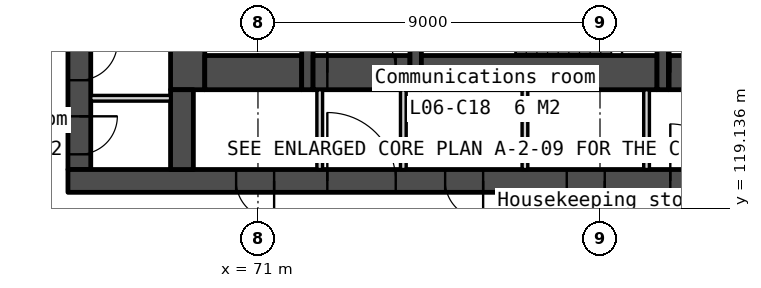
"""IFC4 building model, lengths in metres.
Left out: names, types, materials, properties, quantities, classifications, styles, units other than length and angle.
Written with IfcOpenShell. Run it as: python <this file> out.ifc"""

import sys

from ifc_helpers import new_model, si_unit, direction, frame, frame_2d, origin, place, context, subcontext, project, spatial, polyline, rectangle, outline, extrude, element, fill, save


model = new_model("IFC4")
c1 = context("Model", 3, precision=1e-05, world=origin(), true_north=direction((0.0, 1.0)))
c2 = subcontext(c1, "Body", "Model", "MODEL_VIEW")
j1 = project(units=[si_unit("LENGTHUNIT", "METRE"), si_unit("PLANEANGLEUNIT", "RADIAN")], contexts=[c1])
p1 = place(None, origin())
s1 = spatial("IfcSite", under=j1, at=p1, CompositionType="ELEMENT")
p2 = place(p1, origin())
s2 = spatial("IfcBuilding", under=s1, at=p2, CompositionType="ELEMENT")
p3 = place(p2, frame((0.0, 0.0, 35.0)))
s3 = spatial("IfcBuildingStorey", under=s2, at=p3, CompositionType="ELEMENT", Elevation=35.0)
p4 = place(p3, frame((66.3, 133.95, 0.0), z_axis=(0.0, 0.0, 1.0), x_axis=(0.0, -1.0, 0.0)))
e1 = element("IfcWall", 1, at=p4, inside=s3, PredefinedType="SOLIDWALL", context=c2, shape_type="SweptSolid", body=[
    extrude(rectangle(XDim=13.8, YDim=0.6, at=frame_2d((6.9, 0.0))), origin(), (0.0, 0.0, 1.0), 3.35),
])
p5 = place(p4, frame((0.6, 0.0, 0.0)))
e2 = element("IfcOpeningElement", 2, at=p5, cuts=e1, PredefinedType="OPENING", context=c2, shape_type="SweptSolid", body=[
    extrude(rectangle(XDim=1.1, YDim=2.1, at=frame_2d((0.55, 1.05))), frame((0.0, 0.31, 0.0), z_axis=(0.0, -1.0, 0.0), x_axis=(1.0, 0.0, 0.0)), (0.0, 0.0, 1.0), 0.62),
])
p6 = place(p4, frame((12.4, 0.0, 0.0)))
e3 = element("IfcOpeningElement", 3, at=p6, cuts=e1, PredefinedType="OPENING", context=c2, shape_type="SweptSolid", body=[
    extrude(rectangle(XDim=1.0, YDim=2.1, at=frame_2d((0.5, 1.05))), frame((0.0, 0.31, 0.0), z_axis=(0.0, -1.0, 0.0), x_axis=(1.0, 0.0, 0.0)), (0.0, 0.0, 1.0), 0.62),
])
p7 = place(p4, frame((8.5, 0.0, 0.0)))
e4 = element("IfcOpeningElement", 4, at=p7, cuts=e1, PredefinedType="OPENING", context=c2, shape_type="SweptSolid", body=[
    extrude(rectangle(XDim=1.0, YDim=2.1, at=frame_2d((0.5, 1.05))), frame((0.0, 0.31, 0.0), z_axis=(0.0, -1.0, 0.0), x_axis=(1.0, 0.0, 0.0)), (0.0, 0.0, 1.0), 0.62),
])
p8 = place(p4, frame((10.45, 0.0, 0.0)))
e5 = element("IfcOpeningElement", 5, at=p8, cuts=e1, PredefinedType="OPENING", context=c2, shape_type="SweptSolid", body=[
    extrude(rectangle(XDim=1.0, YDim=2.1, at=frame_2d((0.5, 1.05))), frame((0.0, 0.31, 0.0), z_axis=(0.0, -1.0, 0.0), x_axis=(1.0, 0.0, 0.0)), (0.0, 0.0, 1.0), 0.62),
])
p9 = place(p3, frame((66.0, 119.85, 0.0), z_axis=(0.0, 0.0, 1.0), x_axis=(1.0, 0.0, 0.0)))
e6 = element("IfcWall", 6, at=p9, inside=s3, PredefinedType="SOLIDWALL", context=c2, shape_type="SweptSolid", body=[
    extrude(rectangle(XDim=28.0, YDim=0.6, at=frame_2d((14.0, 0.0))), origin(), (0.0, 0.0, 1.0), 3.35),
])
p10 = place(p9, frame((6.825, 0.0, 0.0)))
e7 = element("IfcOpeningElement", 7, at=p10, cuts=e6, PredefinedType="OPENING", context=c2, shape_type="SweptSolid", body=[
    extrude(rectangle(XDim=1.8, YDim=2.1, at=frame_2d((0.9, 1.05))), frame((0.0, 0.31, 0.0), z_axis=(0.0, -1.0, 0.0), x_axis=(1.0, 0.0, 0.0)), (0.0, 0.0, 1.0), 0.62),
])
p11 = place(p9, frame((15.85, 0.0, 0.0)))
e8 = element("IfcOpeningElement", 8, at=p11, cuts=e6, PredefinedType="OPENING", context=c2, shape_type="SweptSolid", body=[
    extrude(rectangle(XDim=1.5, YDim=2.1, at=frame_2d((0.75, 1.05))), frame((0.0, 0.31, 0.0), z_axis=(0.0, -1.0, 0.0), x_axis=(1.0, 0.0, 0.0)), (0.0, 0.0, 1.0), 0.62),
])
p12 = place(p9, frame((19.375, 0.0, 0.0)))
e9 = element("IfcOpeningElement", 9, at=p12, cuts=e6, PredefinedType="OPENING", context=c2, shape_type="SweptSolid", body=[
    extrude(rectangle(XDim=1.8, YDim=2.1, at=frame_2d((0.9, 1.05))), frame((0.0, 0.31, 0.0), z_axis=(0.0, -1.0, 0.0), x_axis=(1.0, 0.0, 0.0)), (0.0, 0.0, 1.0), 0.62),
])
p13 = place(p9, frame((4.425, 0.0, 0.0)))
e10 = element("IfcOpeningElement", 10, at=p13, cuts=e6, PredefinedType="OPENING", context=c2, shape_type="SweptSolid", body=[
    extrude(rectangle(XDim=1.0, YDim=2.1, at=frame_2d((0.5, 1.05))), frame((0.0, 0.31, 0.0), z_axis=(0.0, -1.0, 0.0), x_axis=(1.0, 0.0, 0.0)), (0.0, 0.0, 1.0), 0.62),
])
p14 = place(p9, frame((9.925, 0.0, 0.0)))
e11 = element("IfcOpeningElement", 11, at=p14, cuts=e6, PredefinedType="OPENING", context=c2, shape_type="SweptSolid", body=[
    extrude(rectangle(XDim=1.0, YDim=2.1, at=frame_2d((0.5, 1.05))), frame((0.0, 0.31, 0.0), z_axis=(0.0, -1.0, 0.0), x_axis=(1.0, 0.0, 0.0)), (0.0, 0.0, 1.0), 0.62),
])
p15 = place(p9, frame((13.125, 0.0, 0.0)))
e12 = element("IfcOpeningElement", 12, at=p15, cuts=e6, PredefinedType="OPENING", context=c2, shape_type="SweptSolid", body=[
    extrude(rectangle(XDim=1.0, YDim=2.1, at=frame_2d((0.5, 1.05))), frame((0.0, 0.31, 0.0), z_axis=(0.0, -1.0, 0.0), x_axis=(1.0, 0.0, 0.0)), (0.0, 0.0, 1.0), 0.62),
])
p16 = place(p9, frame((21.725, 0.0, 0.0)))
e13 = element("IfcOpeningElement", 13, at=p16, cuts=e6, PredefinedType="OPENING", context=c2, shape_type="SweptSolid", body=[
    extrude(rectangle(XDim=1.0, YDim=2.1, at=frame_2d((0.5, 1.05))), frame((0.0, 0.31, 0.0), z_axis=(0.0, -1.0, 0.0), x_axis=(1.0, 0.0, 0.0)), (0.0, 0.0, 1.0), 0.62),
])
p17 = place(p9, frame((23.425, 0.0, 0.0)))
e14 = element("IfcOpeningElement", 14, at=p17, cuts=e6, PredefinedType="OPENING", context=c2, shape_type="SweptSolid", body=[
    extrude(rectangle(XDim=1.0, YDim=2.1, at=frame_2d((0.5, 1.05))), frame((0.0, 0.31, 0.0), z_axis=(0.0, -1.0, 0.0), x_axis=(1.0, 0.0, 0.0)), (0.0, 0.0, 1.0), 0.62),
])
p18 = place(p3, frame((66.6, 122.025, 0.0), z_axis=(0.0, 0.0, 1.0), x_axis=(1.0, 0.0, 0.0)))
e15 = element("IfcWall", 15, at=p18, inside=s3, PredefinedType="PARTITIONING", context=c2, shape_type="SweptSolid", body=[
    extrude(rectangle(XDim=2.1, YDim=0.15, at=frame_2d((1.05, 0.0))), origin(), (0.0, 0.0, 1.0), 3.35),
])
p19 = place(p3, frame((69.15, 133.95, 0.0), z_axis=(0.0, 0.0, 1.0), x_axis=(0.0, -1.0, 0.0)))
e16 = element("IfcWall", 16, at=p19, inside=s3, PredefinedType="SOLIDWALL", context=c2, shape_type="SweptSolid", body=[
    extrude(rectangle(XDim=11.7, YDim=0.9, at=frame_2d((5.85, 0.0))), origin(), (0.0, 0.0, 1.0), 3.35),
])
p20 = place(p3, frame((69.0, 122.25, 0.0), z_axis=(0.0, 0.0, 1.0), x_axis=(0.0, -1.0, 0.0)))
e17 = element("IfcWall", 17, at=p20, inside=s3, PredefinedType="SOLIDWALL", context=c2, shape_type="SweptSolid", body=[
    extrude(rectangle(XDim=2.1, YDim=0.6, at=frame_2d((1.05, 0.0))), origin(), (0.0, 0.0, 1.0), 3.35),
])
p21 = place(p3, frame((69.6, 122.7, 0.0), z_axis=(0.0, 0.0, 1.0), x_axis=(1.0, 0.0, 0.0)))
e18 = element("IfcWall", 18, at=p21, inside=s3, PredefinedType="SOLIDWALL", context=c2, shape_type="SweptSolid", body=[
    extrude(rectangle(XDim=2.55, YDim=0.9, at=frame_2d((1.275, 0.0))), origin(), (0.0, 0.0, 1.0), 3.35),
])
p22 = place(p3, frame((72.3, 133.95, 0.0), z_axis=(0.0, 0.0, 1.0), x_axis=(0.0, -1.0, 0.0)))
e19 = element("IfcWall", 19, at=p22, inside=s3, PredefinedType="SOLIDWALL", context=c2, shape_type="SweptSolid", body=[
    extrude(rectangle(XDim=11.7, YDim=0.3, at=frame_2d((5.85, 0.0))), origin(), (0.0, 0.0, 1.0), 3.35),
])
p23 = place(p22, frame((6.95, 0.0, 0.0)))
e20 = element("IfcOpeningElement", 20, at=p23, cuts=e19, PredefinedType="OPENING", context=c2, shape_type="SweptSolid", body=[
    extrude(rectangle(XDim=1.1, YDim=2.1, at=frame_2d((0.55, 1.05))), frame((0.0, 0.16, 0.0), z_axis=(0.0, -1.0, 0.0), x_axis=(1.0, 0.0, 0.0)), (0.0, 0.0, 1.0), 0.32),
])
p24 = place(p22, frame((9.35, 0.0, 0.0)))
e21 = element("IfcOpeningElement", 21, at=p24, cuts=e19, PredefinedType="OPENING", context=c2, shape_type="SweptSolid", body=[
    extrude(rectangle(XDim=0.9, YDim=2.1, at=frame_2d((0.45, 1.05))), frame((0.0, 0.16, 0.0), z_axis=(0.0, -1.0, 0.0), x_axis=(1.0, 0.0, 0.0)), (0.0, 0.0, 1.0), 0.32),
])
p25 = place(p22, frame((5.1, 0.0, 0.0)))
e22 = element("IfcOpeningElement", 22, at=p25, cuts=e19, PredefinedType="OPENING", context=c2, shape_type="SweptSolid", body=[
    extrude(rectangle(XDim=1.0, YDim=2.1, at=frame_2d((0.5, 1.05))), frame((0.0, 0.16, 0.0), z_axis=(0.0, -1.0, 0.0), x_axis=(1.0, 0.0, 0.0)), (0.0, 0.0, 1.0), 0.32),
])
p26 = place(p3, frame((72.45, 122.7, 0.0), z_axis=(0.0, 0.0, 1.0), x_axis=(1.0, 0.0, 0.0)))
e23 = element("IfcWall", 23, at=p26, inside=s3, PredefinedType="SOLIDWALL", context=c2, shape_type="SweptSolid", body=[
    extrude(rectangle(XDim=2.55, YDim=0.9, at=frame_2d((1.275, 0.0))), origin(), (0.0, 0.0, 1.0), 3.35),
])
p27 = place(p26, frame((0.375, 0.0, 0.0)))
e24 = element("IfcOpeningElement", 24, at=p27, cuts=e23, PredefinedType="OPENING", context=c2, shape_type="SweptSolid", body=[
    extrude(rectangle(XDim=1.8, YDim=2.1, at=frame_2d((0.9, 1.05))), frame((0.0, 0.46, 0.0), z_axis=(0.0, -1.0, 0.0), x_axis=(1.0, 0.0, 0.0)), (0.0, 0.0, 1.0), 0.92),
])
for number, where, z_axis, x_axis in (
    (25, (72.625, 122.25, 0.0), (0.0, 0.0, 1.0), (0.0, -1.0, 0.0)),
    (26, (74.825, 122.25, 0.0), (0.0, 0.0, 1.0), (0.0, -1.0, 0.0)),
):
    element("IfcWall", number, at=place(p3, frame(where, z_axis=z_axis, x_axis=x_axis)), inside=s3, PredefinedType="PARTITIONING", context=c2, shape_type="SweptSolid", body=[
        extrude(rectangle(XDim=2.1, YDim=0.15, at=frame_2d((1.05, 0.0))), origin(), (0.0, 0.0, 1.0), 3.35),
    ])
p28 = place(p3, frame((75.15, 133.95, 0.0), z_axis=(0.0, 0.0, 1.0), x_axis=(0.0, -1.0, 0.0)))
e27 = element("IfcWall", 27, at=p28, inside=s3, PredefinedType="SOLIDWALL", context=c2, shape_type="SweptSolid", body=[
    extrude(rectangle(XDim=11.7, YDim=0.3, at=frame_2d((5.85, 0.0))), origin(), (0.0, 0.0, 1.0), 3.35),
])
p29 = place(p3, frame((75.3, 122.7, 0.0), z_axis=(0.0, 0.0, 1.0), x_axis=(1.0, 0.0, 0.0)))
e28 = element("IfcWall", 28, at=p29, inside=s3, PredefinedType="SOLIDWALL", context=c2, shape_type="SweptSolid", body=[
    extrude(rectangle(XDim=6.2, YDim=0.9, at=frame_2d((3.1, 0.0))), origin(), (0.0, 0.0, 1.0), 3.35),
])
for number, where, z_axis, x_axis in (
    (29, (78.025, 122.25, 0.0), (0.0, 0.0, 1.0), (0.0, -1.0, 0.0)),
    (30, (81.225, 122.25, 0.0), (0.0, 0.0, 1.0), (0.0, -1.0, 0.0)),
):
    element("IfcWall", number, at=place(p3, frame(where, z_axis=z_axis, x_axis=x_axis)), inside=s3, PredefinedType="PARTITIONING", context=c2, shape_type="SweptSolid", body=[
        extrude(rectangle(XDim=2.1, YDim=0.15, at=frame_2d((1.05, 0.0))), origin(), (0.0, 0.0, 1.0), 3.35),
    ])
p30 = place(p3, frame((81.65, 125.7, 0.0), z_axis=(0.0, 0.0, 1.0), x_axis=(0.0, -1.0, 0.0)))
e31 = element("IfcWall", 31, at=p30, inside=s3, PredefinedType="SOLIDWALL", context=c2, shape_type="SweptSolid", body=[
    extrude(rectangle(XDim=3.45, YDim=0.3, at=frame_2d((1.725, 0.0))), origin(), (0.0, 0.0, 1.0), 3.35),
])
p31 = place(p30, frame((0.75, 0.0, 0.0)))
e32 = element("IfcOpeningElement", 32, at=p31, cuts=e31, PredefinedType="OPENING", context=c2, shape_type="SweptSolid", body=[
    extrude(rectangle(XDim=1.0, YDim=2.1, at=frame_2d((0.5, 1.05))), frame((0.0, 0.16, 0.0), z_axis=(0.0, -1.0, 0.0), x_axis=(1.0, 0.0, 0.0)), (0.0, 0.0, 1.0), 0.32),
])
p32 = place(p3, frame((81.8, 122.7, 0.0), z_axis=(0.0, 0.0, 1.0), x_axis=(1.0, 0.0, 0.0)))
e33 = element("IfcWall", 33, at=p32, inside=s3, PredefinedType="SOLIDWALL", context=c2, shape_type="SweptSolid", body=[
    extrude(rectangle(XDim=2.9, YDim=0.9, at=frame_2d((1.45, 0.0))), origin(), (0.0, 0.0, 1.0), 3.35),
])
p33 = place(p32, frame((0.05, 0.0, 0.0)))
e34 = element("IfcOpeningElement", 34, at=p33, cuts=e33, PredefinedType="OPENING", context=c2, shape_type="SweptSolid", body=[
    extrude(rectangle(XDim=1.5, YDim=2.1, at=frame_2d((0.75, 1.05))), frame((0.0, 0.46, 0.0), z_axis=(0.0, -1.0, 0.0), x_axis=(1.0, 0.0, 0.0)), (0.0, 0.0, 1.0), 0.92),
])
p34 = place(p3, frame((54.495, 129.397, -0.2), z_axis=(0.0, 0.0, 1.0), x_axis=(0.499999201451, -0.866025864826, 0.0)))
e35 = element("IfcWall", 35, at=p34, inside=s3, PredefinedType="SOLIDWALL", context=c2, shape_type="SweptSolid", body=[
    extrude(outline(polyline([(44.8, 0.0), (44.8, 3.55), (0.0, 3.55), (0.0, 0.0), (44.8, 0.0)])), frame((0.0, 0.225, 0.0), z_axis=(0.0, -1.0, 0.0), x_axis=(1.0, 0.0, 0.0)), (0.0, 0.0, 1.0), 0.45),
])
p35 = place(p34, frame((2.43, 0.0, 1.1)))
e36 = element("IfcOpeningElement", 36, at=p35, cuts=e35, PredefinedType="OPENING", context=c2, shape_type="SweptSolid", body=[
    extrude(rectangle(XDim=1.8, YDim=1.5, at=frame_2d((0.9, 0.75))), frame((0.0, 0.235, 0.0), z_axis=(0.0, -1.0, 0.0), x_axis=(1.0, 0.0, 0.0)), (0.0, 0.0, 1.0), 0.47),
])
p36 = place(p34, frame((4.73, 0.0, 0.2)))
e37 = element("IfcOpeningElement", 37, at=p36, cuts=e35, PredefinedType="OPENING", context=c2, shape_type="SweptSolid", body=[
    extrude(rectangle(XDim=1.8, YDim=2.4, at=frame_2d((0.9, 1.2))), frame((0.0, 0.235, 0.0), z_axis=(0.0, -1.0, 0.0), x_axis=(1.0, 0.0, 0.0)), (0.0, 0.0, 1.0), 0.47),
])
p37 = place(p34, frame((11.39, 0.0, 1.1)))
e38 = element("IfcOpeningElement", 38, at=p37, cuts=e35, PredefinedType="OPENING", context=c2, shape_type="SweptSolid", body=[
    extrude(rectangle(XDim=1.8, YDim=1.5, at=frame_2d((0.9, 0.75))), frame((0.0, 0.235, 0.0), z_axis=(0.0, -1.0, 0.0), x_axis=(1.0, 0.0, 0.0)), (0.0, 0.0, 1.0), 0.47),
])
p38 = place(p34, frame((13.69, 0.0, 1.1)))
e39 = element("IfcOpeningElement", 39, at=p38, cuts=e35, PredefinedType="OPENING", context=c2, shape_type="SweptSolid", body=[
    extrude(rectangle(XDim=1.8, YDim=1.5, at=frame_2d((0.9, 0.75))), frame((0.0, 0.235, 0.0), z_axis=(0.0, -1.0, 0.0), x_axis=(1.0, 0.0, 0.0)), (0.0, 0.0, 1.0), 0.47),
])
p39 = place(p34, frame((20.35, 0.0, 0.2)))
e40 = element("IfcOpeningElement", 40, at=p39, cuts=e35, PredefinedType="OPENING", context=c2, shape_type="SweptSolid", body=[
    extrude(rectangle(XDim=1.8, YDim=2.4, at=frame_2d((0.9, 1.2))), frame((0.0, 0.235, 0.0), z_axis=(0.0, -1.0, 0.0), x_axis=(1.0, 0.0, 0.0)), (0.0, 0.0, 1.0), 0.47),
])
p40 = place(p34, frame((22.65, 0.0, 1.1)))
e41 = element("IfcOpeningElement", 41, at=p40, cuts=e35, PredefinedType="OPENING", context=c2, shape_type="SweptSolid", body=[
    extrude(rectangle(XDim=1.8, YDim=1.5, at=frame_2d((0.9, 0.75))), frame((0.0, 0.235, 0.0), z_axis=(0.0, -1.0, 0.0), x_axis=(1.0, 0.0, 0.0)), (0.0, 0.0, 1.0), 0.47),
])
p41 = place(p34, frame((29.31, 0.0, 1.1)))
e42 = element("IfcOpeningElement", 42, at=p41, cuts=e35, PredefinedType="OPENING", context=c2, shape_type="SweptSolid", body=[
    extrude(rectangle(XDim=1.8, YDim=1.5, at=frame_2d((0.9, 0.75))), frame((0.0, 0.235, 0.0), z_axis=(0.0, -1.0, 0.0), x_axis=(1.0, 0.0, 0.0)), (0.0, 0.0, 1.0), 0.47),
])
p42 = place(p34, frame((31.61, 0.0, 0.2)))
e43 = element("IfcOpeningElement", 43, at=p42, cuts=e35, PredefinedType="OPENING", context=c2, shape_type="SweptSolid", body=[
    extrude(rectangle(XDim=1.8, YDim=2.4, at=frame_2d((0.9, 1.2))), frame((0.0, 0.235, 0.0), z_axis=(0.0, -1.0, 0.0), x_axis=(1.0, 0.0, 0.0)), (0.0, 0.0, 1.0), 0.47),
])
p43 = place(p34, frame((38.27, 0.0, 1.1)))
e44 = element("IfcOpeningElement", 44, at=p43, cuts=e35, PredefinedType="OPENING", context=c2, shape_type="SweptSolid", body=[
    extrude(rectangle(XDim=1.8, YDim=1.5, at=frame_2d((0.9, 0.75))), frame((0.0, 0.235, 0.0), z_axis=(0.0, -1.0, 0.0), x_axis=(1.0, 0.0, 0.0)), (0.0, 0.0, 1.0), 0.47),
])
p44 = place(p34, frame((40.57, 0.0, 1.1)))
e45 = element("IfcOpeningElement", 45, at=p44, cuts=e35, PredefinedType="OPENING", context=c2, shape_type="SweptSolid", body=[
    extrude(rectangle(XDim=1.8, YDim=1.5, at=frame_2d((0.9, 0.75))), frame((0.0, 0.235, 0.0), z_axis=(0.0, -1.0, 0.0), x_axis=(1.0, 0.0, 0.0)), (0.0, 0.0, 1.0), 0.47),
])
p45 = place(p3, frame((77.166, 81.679, 0.0), z_axis=(0.0, 0.0, 1.0), x_axis=(-0.500001932243, 0.8660242882, 0.0)))
e46 = element("IfcWall", 46, at=p45, inside=s3, PredefinedType="STANDARD", context=c2, shape_type="SweptSolid", body=[
    extrude(rectangle(XDim=54.747, YDim=1.0, at=frame_2d((27.374, 0.0))), origin(), (0.0, 0.0, 1.0), 0.6),
])
p46 = place(p27, origin())
e47 = element("IfcDoor", 47, at=p46, inside=s3, OperationType="DOUBLE_DOOR_DOUBLE_SWING", PredefinedType="DOOR", context=c2, shape_type="SweptSolid", body=[
    extrude(rectangle(XDim=1.8, YDim=2.1, at=frame_2d((0.9, 1.05))), frame((0.0, 0.025, 0.0), z_axis=(0.0, -1.0, 0.0), x_axis=(1.0, 0.0, 0.0)), (0.0, 0.0, 1.0), 0.05),
])
fill(e24, e47)
p47 = place(p33, origin())
e48 = element("IfcDoor", 48, at=p47, inside=s3, OperationType="DOUBLE_DOOR_DOUBLE_SWING", PredefinedType="DOOR", context=c2, shape_type="SweptSolid", body=[
    extrude(rectangle(XDim=1.5, YDim=2.1, at=frame_2d((0.75, 1.05))), frame((0.0, 0.025, 0.0), z_axis=(0.0, -1.0, 0.0), x_axis=(1.0, 0.0, 0.0)), (0.0, 0.0, 1.0), 0.05),
])
fill(e34, e48)
p48 = place(p10, origin())
e49 = element("IfcDoor", 49, at=p48, inside=s3, OperationType="DOUBLE_DOOR_DOUBLE_SWING", PredefinedType="DOOR", context=c2, shape_type="SweptSolid", body=[
    extrude(rectangle(XDim=1.8, YDim=2.1, at=frame_2d((0.9, 1.05))), frame((0.0, 0.025, 0.0), z_axis=(0.0, -1.0, 0.0), x_axis=(1.0, 0.0, 0.0)), (0.0, 0.0, 1.0), 0.05),
])
fill(e7, e49)
p49 = place(p11, origin())
e50 = element("IfcDoor", 50, at=p49, inside=s3, OperationType="DOUBLE_DOOR_DOUBLE_SWING", PredefinedType="DOOR", context=c2, shape_type="SweptSolid", body=[
    extrude(rectangle(XDim=1.5, YDim=2.1, at=frame_2d((0.75, 1.05))), frame((0.0, 0.025, 0.0), z_axis=(0.0, -1.0, 0.0), x_axis=(1.0, 0.0, 0.0)), (0.0, 0.0, 1.0), 0.05),
])
fill(e8, e50)
p50 = place(p13, origin())
e51 = element("IfcDoor", 51, at=p50, inside=s3, OperationType="SINGLE_SWING_RIGHT", PredefinedType="DOOR", context=c2, shape_type="SweptSolid", body=[
    extrude(rectangle(XDim=1.0, YDim=2.1, at=frame_2d((0.5, 1.05))), frame((0.0, 0.025, 0.0), z_axis=(0.0, -1.0, 0.0), x_axis=(1.0, 0.0, 0.0)), (0.0, 0.0, 1.0), 0.05),
])
fill(e10, e51)
p51 = place(p14, origin())
e52 = element("IfcDoor", 52, at=p51, inside=s3, OperationType="SINGLE_SWING_RIGHT", PredefinedType="DOOR", context=c2, shape_type="SweptSolid", body=[
    extrude(rectangle(XDim=1.0, YDim=2.1, at=frame_2d((0.5, 1.05))), frame((0.0, 0.025, 0.0), z_axis=(0.0, -1.0, 0.0), x_axis=(1.0, 0.0, 0.0)), (0.0, 0.0, 1.0), 0.05),
])
fill(e11, e52)
p52 = place(p15, origin())
e53 = element("IfcDoor", 53, at=p52, inside=s3, OperationType="SINGLE_SWING_RIGHT", PredefinedType="DOOR", context=c2, shape_type="SweptSolid", body=[
    extrude(rectangle(XDim=1.0, YDim=2.1, at=frame_2d((0.5, 1.05))), frame((0.0, 0.025, 0.0), z_axis=(0.0, -1.0, 0.0), x_axis=(1.0, 0.0, 0.0)), (0.0, 0.0, 1.0), 0.05),
])
fill(e12, e53)
p53 = place(p6, origin())
e54 = element("IfcDoor", 54, at=p53, inside=s3, OperationType="SINGLE_SWING_LEFT", PredefinedType="DOOR", context=c2, shape_type="SweptSolid", body=[
    extrude(rectangle(XDim=1.0, YDim=2.1, at=frame_2d((0.5, 1.05))), frame((0.0, 0.025, 0.0), z_axis=(0.0, -1.0, 0.0), x_axis=(1.0, 0.0, 0.0)), (0.0, 0.0, 1.0), 0.05),
])
fill(e3, e54)
p54 = place(p8, origin())
e55 = element("IfcDoor", 55, at=p54, inside=s3, OperationType="SINGLE_SWING_LEFT", PredefinedType="DOOR", context=c2, shape_type="SweptSolid", body=[
    extrude(rectangle(XDim=1.0, YDim=2.1, at=frame_2d((0.5, 1.05))), frame((0.0, 0.025, 0.0), z_axis=(0.0, -1.0, 0.0), x_axis=(1.0, 0.0, 0.0)), (0.0, 0.0, 1.0), 0.05),
])
fill(e5, e55)
save(model, sys.argv[1])
